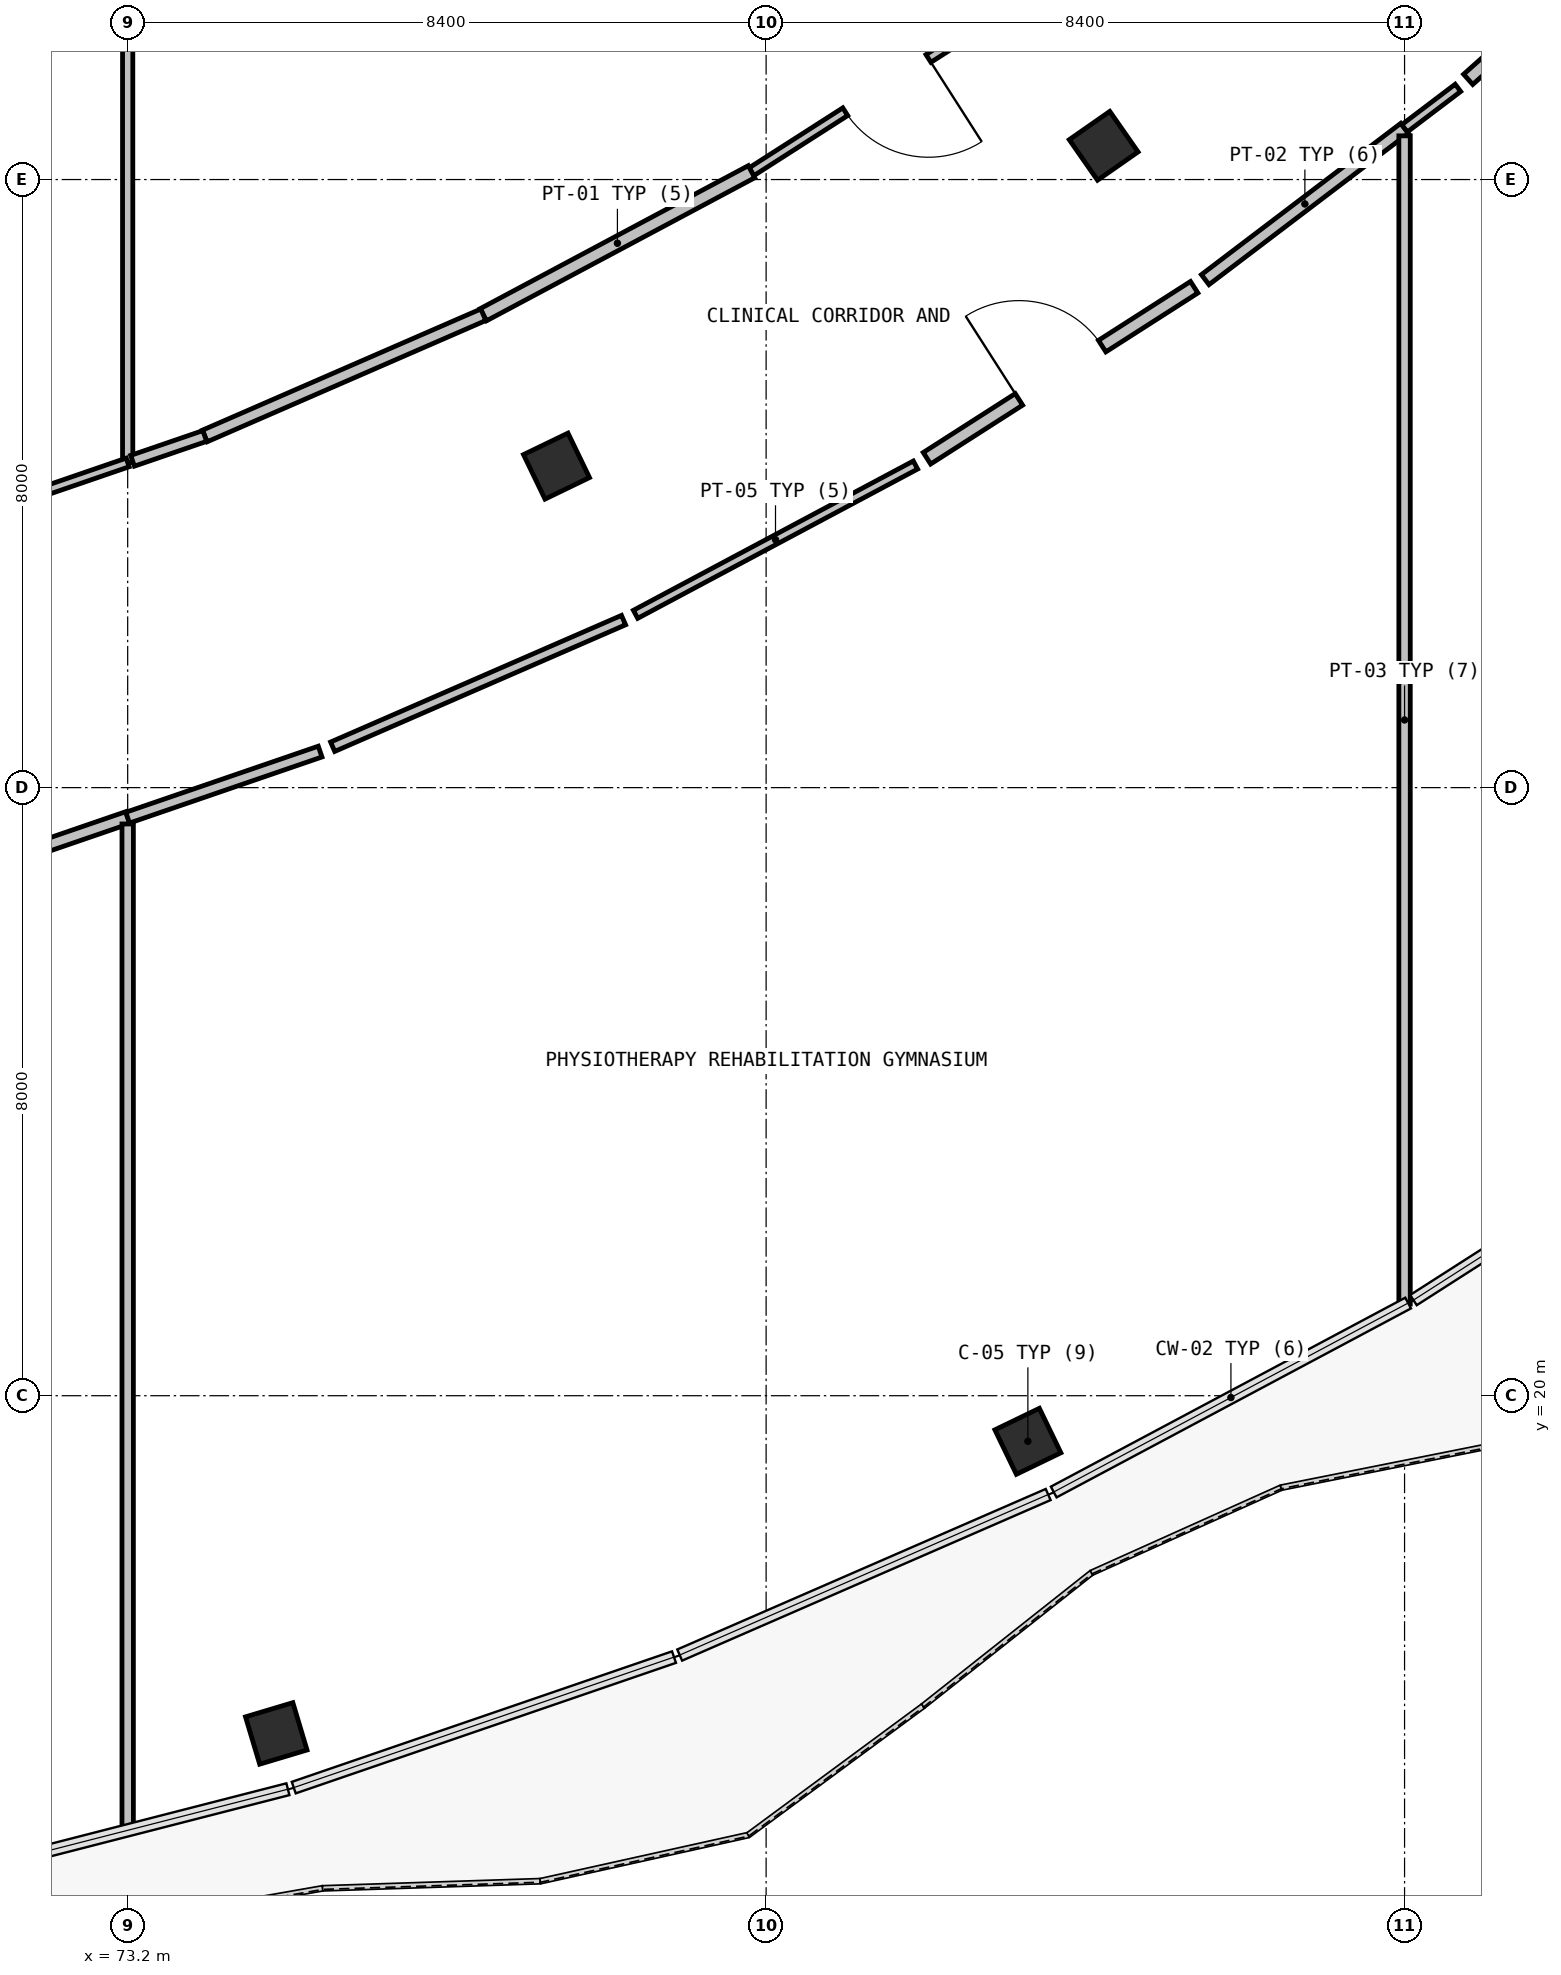
"""IFC4 building model, lengths in metres.
Left out: names, types, materials, properties, quantities, classifications, styles, units other than length and angle.
Written with IfcOpenShell. Run it as: python <this file> out.ifc"""

import sys

from ifc_helpers import new_model, si_unit, direction, frame, frame_2d, origin, origin_2d, place, context, subcontext, project, spatial, rectangle, extrude, element, fill, save


model = new_model("IFC4")
c1 = context("Model", 3, precision=1e-05, world=origin(), true_north=direction((0.0, 1.0)))
c2 = subcontext(c1, "Body", "Model", "MODEL_VIEW")
j1 = project(units=[si_unit("LENGTHUNIT", "METRE"), si_unit("PLANEANGLEUNIT", "RADIAN")], contexts=[c1])
p1 = place(None, origin())
s1 = spatial("IfcSite", under=j1, at=p1, CompositionType="ELEMENT")
p2 = place(p1, origin())
s2 = spatial("IfcBuilding", under=s1, at=p2, CompositionType="ELEMENT")
p3 = place(p2, frame((0.0, 0.0, 10.2)))
s3 = spatial("IfcBuildingStorey", under=s2, at=p3, CompositionType="ELEMENT", Elevation=10.2)
for number, where, z_axis, x_axis in (
    (1, (75.155, 15.557, 0.0), (0.0, 0.0, 1.0), (-0.287, 0.958, 0.0)),
    (2, (78.842, 32.23, 0.0), (0.0, 0.0, 1.0), (-0.435, 0.9, 0.0)),
    (3, (85.044, 19.4, 0.0), (0.0, 0.0, 1.0), (-0.435, 0.9, 0.0)),
    (4, (86.041, 36.444, 0.0), (0.0, 0.0, 1.0), (-0.572, 0.82, 0.0)),
):
    element("IfcColumn", number, at=place(p3, frame(where, z_axis=z_axis, x_axis=x_axis)), inside=s3, PredefinedType="COLUMN", context=c2, shape_type="SweptSolid", body=[
        extrude(rectangle(XDim=0.65, YDim=0.65, at=origin_2d()), origin(), (0.0, 0.0, 1.0), 4.8),
    ])
p4 = place(p3, frame((71.784, 27.119, 0.0), z_axis=(0.0, 0.0, 1.0), x_axis=(0.945824378739, 0.324678678978, 0.0)))
e5 = element("IfcWall", 5, at=p4, inside=s3, PredefinedType="PARTITIONING", context=c2, shape_type="SweptSolid", body=[
    extrude(rectangle(XDim=1.497, YDim=0.165, at=frame_2d((0.749, 0.0))), origin(), (0.0, 0.0, 1.0), 4.46),
])
p5 = place(p3, frame((73.2, 27.522, 0.0), z_axis=(0.0, 0.0, 1.0), x_axis=(0.0, -1.0, 0.0)))
e6 = element("IfcWall", 6, at=p5, inside=s3, PredefinedType="PARTITIONING", context=c2, shape_type="SweptSolid", body=[
    extrude(rectangle(XDim=13.229, YDim=0.15, at=frame_2d((6.615, 0.0))), origin(), (0.0, 0.0, 1.0), 3.76),
])
p6 = place(p3, frame((73.2, 46.195, 0.0), z_axis=(0.0, 0.0, 1.0), x_axis=(0.0, -1.0, 0.0)))
e7 = element("IfcWall", 7, at=p6, inside=s3, PredefinedType="PARTITIONING", context=c2, shape_type="SweptSolid", body=[
    extrude(rectangle(XDim=13.917, YDim=0.135, at=frame_2d((6.958, 0.0))), origin(), (0.0, 0.0, 1.0), 4.46),
])
p7 = place(p3, frame((73.2, 32.278, 0.0), z_axis=(0.0, 0.0, 1.0), x_axis=(-0.94578196559, -0.324802206836, 0.0)))
e8 = element("IfcWall", 8, at=p7, inside=s3, PredefinedType="PARTITIONING", context=c2, shape_type="SweptSolid", body=[
    extrude(rectangle(XDim=2.926, YDim=0.12, at=frame_2d((1.463, 0.0))), origin(), (0.0, 0.0, 1.0), 4.46),
])
p8 = place(p3, frame((73.2, 27.605, 0.0), z_axis=(0.0, 0.0, 1.0), x_axis=(0.945827570445, 0.324669381042, 0.0)))
e9 = element("IfcWall", 9, at=p8, inside=s3, PredefinedType="PARTITIONING", context=c2, shape_type="SweptSolid", body=[
    extrude(rectangle(XDim=2.677, YDim=0.15, at=frame_2d((1.338, 0.0))), origin(), (0.0, 0.0, 1.0), 4.46),
])
p9 = place(p3, frame((75.897, 28.538, 0.0), z_axis=(0.0, 0.0, 1.0), x_axis=(0.916891425258, 0.399136711276, 0.0)))
e10 = element("IfcWall", 10, at=p9, inside=s3, PredefinedType="PARTITIONING", context=c2, shape_type="SweptSolid", body=[
    extrude(rectangle(XDim=4.174, YDim=0.135, at=frame_2d((2.087, 0.0))), origin(), (0.0, 0.0, 1.0), 4.46),
])
p10 = place(p3, frame((79.882, 30.28, 0.0), z_axis=(0.0, 0.0, 1.0), x_axis=(0.882385323431, 0.470527513535, 0.0)))
e11 = element("IfcWall", 11, at=p10, inside=s3, PredefinedType="PARTITIONING", context=c2, shape_type="SweptSolid", body=[
    extrude(rectangle(XDim=4.174, YDim=0.12, at=frame_2d((2.087, 0.0))), origin(), (0.0, 0.0, 1.0), 4.46),
])
p11 = place(p3, frame((83.716, 32.333, 0.0), z_axis=(0.0, 0.0, 1.0), x_axis=(0.842288395676, 0.539027140792, 0.0)))
e12 = element("IfcWall", 12, at=p11, inside=s3, PredefinedType="PARTITIONING", context=c2, shape_type="SweptSolid", body=[
    extrude(rectangle(XDim=4.174, YDim=0.18, at=frame_2d((2.087, 0.0))), origin(), (0.0, 0.0, 1.0), 4.46),
])
p12 = place(p11, frame((1.437, 0.0, 0.0)))
e13 = element("IfcOpeningElement", 13, at=p12, cuts=e12, PredefinedType="OPENING", context=c2, shape_type="SweptSolid", body=[
    extrude(rectangle(XDim=1.3, YDim=2.15, at=frame_2d((0.65, 1.075))), frame((0.0, 0.1, 0.0), z_axis=(0.0, -1.0, 0.0), x_axis=(1.0, 0.0, 0.0)), (0.0, 0.0, 1.0), 0.2),
])
p13 = place(p3, frame((87.377, 34.683, 0.0), z_axis=(0.0, 0.0, 1.0), x_axis=(0.796534911727, 0.604592535846, 0.0)))
e14 = element("IfcWall", 14, at=p13, inside=s3, PredefinedType="PARTITIONING", context=c2, shape_type="SweptSolid", body=[
    extrude(rectangle(XDim=3.293, YDim=0.165, at=frame_2d((1.646, 0.0))), origin(), (0.0, 0.0, 1.0), 4.46),
])
p14 = place(p3, frame((90.0, 36.575, 0.0), z_axis=(0.0, 0.0, 1.0), x_axis=(0.0, -1.0, 0.0)))
e15 = element("IfcWall", 15, at=p14, inside=s3, PredefinedType="PARTITIONING", context=c2, shape_type="SweptSolid", body=[
    extrude(rectangle(XDim=15.369, YDim=0.15, at=frame_2d((7.685, 0.0))), origin(), (0.0, 0.0, 1.0), 4.46),
])
p15 = place(p3, frame((84.97, 38.383, 0.0), z_axis=(0.0, 0.0, 1.0), x_axis=(-0.842234705141, -0.539111028877, 0.0)))
e16 = element("IfcWall", 16, at=p15, inside=s3, PredefinedType="PARTITIONING", context=c2, shape_type="SweptSolid", body=[
    extrude(rectangle(XDim=4.229, YDim=0.12, at=frame_2d((2.115, 0.0))), origin(), (0.0, 0.0, 1.0), 4.46),
])
p16 = place(p15, frame((1.465, 0.0, 0.0)))
e17 = element("IfcOpeningElement", 17, at=p16, cuts=e16, PredefinedType="OPENING", context=c2, shape_type="SweptSolid", body=[
    extrude(rectangle(XDim=1.3, YDim=2.15, at=frame_2d((0.65, 1.075))), frame((0.0, 0.07, 0.0), z_axis=(0.0, -1.0, 0.0), x_axis=(1.0, 0.0, 0.0)), (0.0, 0.0, 1.0), 0.14),
])
p17 = place(p3, frame((81.408, 36.103, 0.0), z_axis=(0.0, 0.0, 1.0), x_axis=(-0.882361389747, -0.470572393882, 0.0)))
e18 = element("IfcWall", 18, at=p17, inside=s3, PredefinedType="PARTITIONING", context=c2, shape_type="SweptSolid", body=[
    extrude(rectangle(XDim=4.0, YDim=0.18, at=frame_2d((2.0, 0.0))), origin(), (0.0, 0.0, 1.0), 4.46),
])
p18 = place(p3, frame((77.879, 34.221, 0.0), z_axis=(0.0, 0.0, 1.0), x_axis=(-0.916925298724, -0.399058888586, 0.0)))
e19 = element("IfcWall", 19, at=p18, inside=s3, PredefinedType="PARTITIONING", context=c2, shape_type="SweptSolid", body=[
    extrude(rectangle(XDim=3.997, YDim=0.165, at=frame_2d((1.999, 0.0))), origin(), (0.0, 0.0, 1.0), 4.46),
])
p19 = place(p3, frame((74.214, 32.626, 0.0), z_axis=(0.0, 0.0, 1.0), x_axis=(-0.945901199619, -0.324454805111, 0.0)))
e20 = element("IfcWall", 20, at=p19, inside=s3, PredefinedType="PARTITIONING", context=c2, shape_type="SweptSolid", body=[
    extrude(rectangle(XDim=1.005, YDim=0.15, at=frame_2d((0.502, 0.0))), origin(), (0.0, 0.0, 1.0), 4.46),
])
p20 = place(p3, frame((90.0, 36.674, 0.0), z_axis=(0.0, 0.0, 1.0), x_axis=(0.796962746225, 0.60402846053, 0.0)))
e21 = element("IfcWall", 21, at=p20, inside=s3, PredefinedType="PARTITIONING", context=c2, shape_type="SweptSolid", body=[
    extrude(rectangle(XDim=0.881, YDim=0.12, at=frame_2d((0.44, 0.0))), origin(), (0.0, 0.0, 1.0), 4.46),
])
p21 = place(p3, frame((90.837, 37.318, 0.0), z_axis=(0.0, 0.0, 1.0), x_axis=(0.746227117169, 0.66569143723, 0.0)))
e22 = element("IfcWall", 22, at=p21, inside=s3, PredefinedType="PARTITIONING", context=c2, shape_type="SweptSolid", body=[
    extrude(rectangle(XDim=4.174, YDim=0.18, at=frame_2d((2.087, 0.0))), origin(), (0.0, 0.0, 1.0), 4.46),
])
p22 = place(p21, frame((1.362, 0.0, 0.0)))
e23 = element("IfcOpeningElement", 23, at=p22, cuts=e22, PredefinedType="OPENING", context=c2, shape_type="SweptSolid", body=[
    extrude(rectangle(XDim=1.45, YDim=2.15, at=frame_2d((0.725, 1.075))), frame((0.0, 0.1, 0.0), z_axis=(0.0, -1.0, 0.0), x_axis=(1.0, 0.0, 0.0)), (0.0, 0.0, 1.0), 0.2),
])
p23 = place(p12, origin())
e24 = element("IfcDoor", 24, at=p23, inside=s3, OperationType="SINGLE_SWING_LEFT", PredefinedType="DOOR", context=c2, shape_type="SweptSolid", body=[
    extrude(rectangle(XDim=1.3, YDim=2.15, at=frame_2d((0.65, 1.075))), frame((0.0, 0.025, 0.0), z_axis=(0.0, -1.0, 0.0), x_axis=(1.0, 0.0, 0.0)), (0.0, 0.0, 1.0), 0.05),
])
fill(e13, e24)
p24 = place(p16, origin())
e25 = element("IfcDoor", 25, at=p24, inside=s3, OperationType="SINGLE_SWING_RIGHT", PredefinedType="DOOR", context=c2, shape_type="SweptSolid", body=[
    extrude(rectangle(XDim=1.3, YDim=2.15, at=frame_2d((0.65, 1.075))), frame((0.0, 0.025, 0.0), z_axis=(0.0, -1.0, 0.0), x_axis=(1.0, 0.0, 0.0)), (0.0, 0.0, 1.0), 0.05),
])
fill(e17, e25)
save(model, sys.argv[1])
